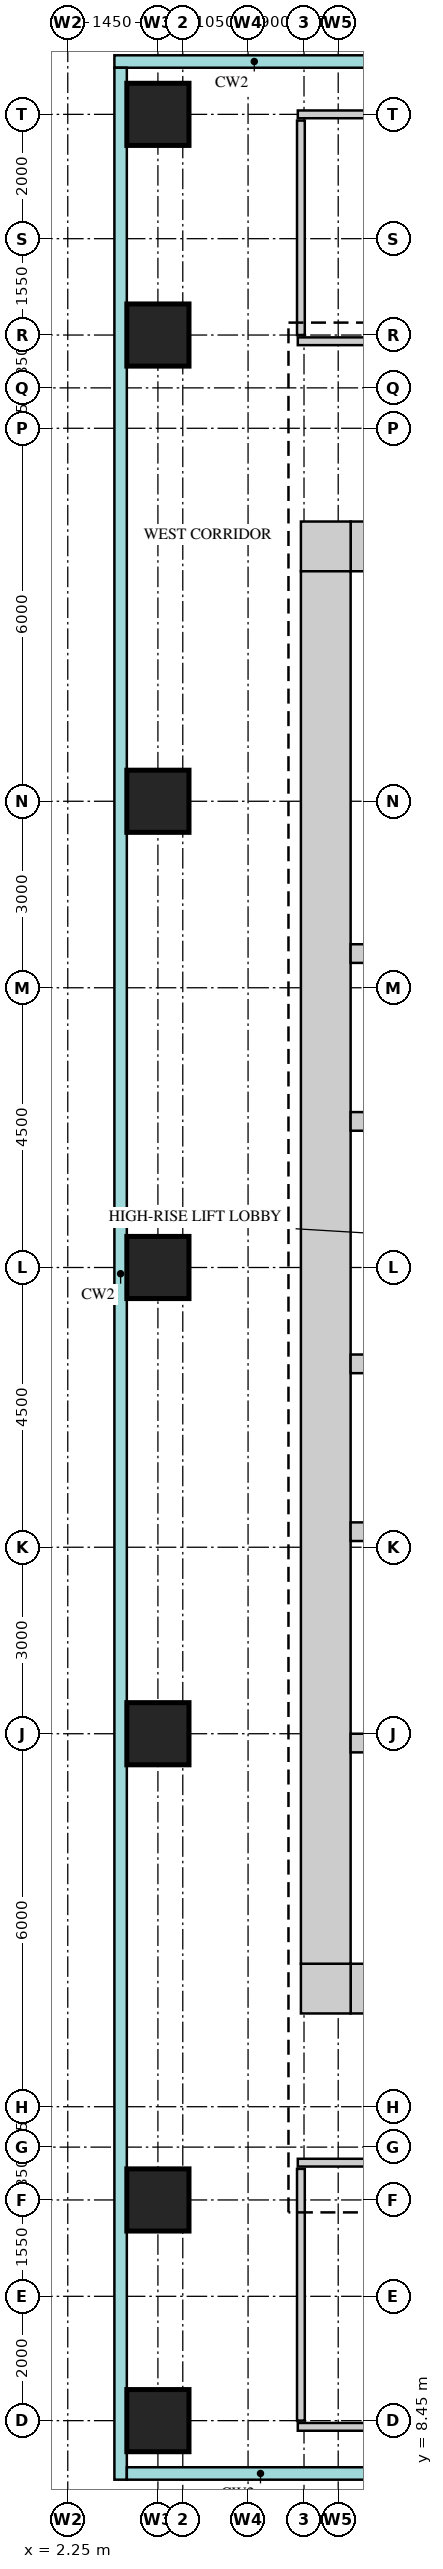
"""IFC4 building model, lengths in metres.
Left out: names, types, materials, properties, quantities, classifications, styles, units other than length and angle.
Written with IfcOpenShell. Run it as: python <this file> out.ifc"""

import sys

from ifc_helpers import new_model, si_unit, direction, frame, frame_2d, origin, origin_2d, place, context, subcontext, project, spatial, rectangle, extrude, source, transform, mapped, element, save


model = new_model("IFC4")
c1 = context("Model", 3, precision=1e-05, world=origin(), true_north=direction((0.0, 1.0)))
c2 = subcontext(c1, "Body", "Model", "MODEL_VIEW")
j1 = project(units=[si_unit("LENGTHUNIT", "METRE"), si_unit("PLANEANGLEUNIT", "RADIAN")], contexts=[c1])
p1 = place(None, origin())
s1 = spatial("IfcSite", under=j1, at=p1, CompositionType="ELEMENT")
p2 = place(p1, origin())
s2 = spatial("IfcBuilding", under=s1, at=p2, CompositionType="ELEMENT")
p3 = place(p2, frame((0.0, 0.0, 208.7)))
s3 = spatial("IfcBuildingStorey", under=s2, at=p3, CompositionType="ELEMENT", Elevation=208.7)
m1 = source(origin(), c2, "Body", "SweptSolid", [
    extrude(rectangle(XDim=13.4, YDim=0.8, at=frame_2d((6.7, 0.0))), origin(), (0.0, 0.0, 1.0), 3.75),
])
p4 = place(p3, frame((6.8, 38.6, 0.0), z_axis=(0.0, 0.0, 1.0), x_axis=(1.0, 0.0, 0.0)))
e1 = element("IfcWall", 1, at=p4, inside=s3, PredefinedType="SHEAR", context=c2, shape_type="MappedRepresentation", body=[
    mapped(m1, transform((0.0, 0.0, 0.0))),
])
m2 = source(origin(), c2, "Body", "SweptSolid", [
    extrude(rectangle(XDim=0.9, YDim=2.1, at=frame_2d((0.45, 1.05))), frame((0.0, 0.41, 0.0), z_axis=(0.0, -1.0, 0.0), x_axis=(1.0, 0.0, 0.0)), (0.0, 0.0, 1.0), 0.82),
])
p5 = place(p4, frame((2.9, 0.0, 0.0)))
e2 = element("IfcOpeningElement", 2, at=p5, cuts=e1, PredefinedType="OPENING", context=c2, shape_type="MappedRepresentation", body=[
    mapped(m2, transform((0.0, 0.0, 0.0))),
])
p6 = place(p4, frame((7.9, 0.0, 0.0)))
e3 = element("IfcOpeningElement", 3, at=p6, cuts=e1, PredefinedType="OPENING", context=c2, shape_type="MappedRepresentation", body=[
    mapped(m2, transform((0.0, 0.0, 0.0))),
])
p7 = place(p4, frame((11.25, 0.0, 0.0)))
e4 = element("IfcOpeningElement", 4, at=p7, cuts=e1, PredefinedType="OPENING", context=c2, shape_type="MappedRepresentation", body=[
    mapped(m2, transform((0.0, 0.0, 0.0))),
])
m3 = source(origin(), c2, "Body", "SweptSolid", [
    extrude(rectangle(XDim=0.8, YDim=0.8, at=frame_2d((0.4, 0.0))), origin(), (0.0, 0.0, 1.0), 3.75),
])
p8 = place(p3, frame((6.0, 38.6, 0.0), z_axis=(0.0, 0.0, 1.0), x_axis=(1.0, 0.0, 0.0)))
e5 = element("IfcWall", 5, at=p8, inside=s3, PredefinedType="SHEAR", context=c2, shape_type="MappedRepresentation", body=[
    mapped(m3, transform((0.0, 0.0, 0.0))),
])
p9 = place(p3, frame((6.8, 15.4, 0.0), z_axis=(0.0, 0.0, 1.0), x_axis=(1.0, 0.0, 0.0)))
e6 = element("IfcWall", 6, at=p9, inside=s3, PredefinedType="SHEAR", context=c2, shape_type="MappedRepresentation", body=[
    mapped(m1, transform((0.0, 0.0, 0.0))),
])
m4 = source(origin(), c2, "Body", "SweptSolid", [
    extrude(rectangle(XDim=1.2, YDim=2.1, at=frame_2d((0.6, 1.05))), frame((0.0, 0.41, 0.0), z_axis=(0.0, -1.0, 0.0), x_axis=(1.0, 0.0, 0.0)), (0.0, 0.0, 1.0), 0.82),
])
p10 = place(p9, frame((5.4, 0.0, 0.0)))
e7 = element("IfcOpeningElement", 7, at=p10, cuts=e6, PredefinedType="OPENING", context=c2, shape_type="MappedRepresentation", body=[
    mapped(m4, transform((0.0, 0.0, 0.0))),
])
p11 = place(p9, frame((2.05, 0.0, 0.0)))
e8 = element("IfcOpeningElement", 8, at=p11, cuts=e6, PredefinedType="OPENING", context=c2, shape_type="MappedRepresentation", body=[
    mapped(m4, transform((0.0, 0.0, 0.0))),
])
m5 = source(origin(), c2, "Body", "SweptSolid", [
    extrude(rectangle(XDim=1.0, YDim=2.1, at=frame_2d((0.5, 1.05))), frame((0.0, 0.41, 0.0), z_axis=(0.0, -1.0, 0.0), x_axis=(1.0, 0.0, 0.0)), (0.0, 0.0, 1.0), 0.82),
])
p12 = place(p9, frame((7.9, 0.0, 0.0)))
e9 = element("IfcOpeningElement", 9, at=p12, cuts=e6, PredefinedType="OPENING", context=c2, shape_type="MappedRepresentation", body=[
    mapped(m5, transform((0.0, 0.0, 0.0))),
])
p13 = place(p3, frame((6.0, 15.4, 0.0), z_axis=(0.0, 0.0, 1.0), x_axis=(1.0, 0.0, 0.0)))
e10 = element("IfcWall", 10, at=p13, inside=s3, PredefinedType="SHEAR", context=c2, shape_type="MappedRepresentation", body=[
    mapped(m3, transform((0.0, 0.0, 0.0))),
])
m6 = source(origin(), c2, "Body", "SweptSolid", [
    extrude(rectangle(XDim=22.4, YDim=0.8, at=frame_2d((11.2, 0.0))), origin(), (0.0, 0.0, 1.0), 3.75),
])
p14 = place(p3, frame((6.4, 15.8, 0.0), z_axis=(0.0, 0.0, 1.0), x_axis=(0.0, 1.0, 0.0)))
e11 = element("IfcWall", 11, at=p14, inside=s3, PredefinedType="SHEAR", context=c2, shape_type="MappedRepresentation", body=[
    mapped(m6, transform((0.0, 0.0, 0.0))),
])
m7 = source(origin(), c2, "Body", "SweptSolid", [
    extrude(rectangle(XDim=13.4, YDim=0.3, at=frame_2d((6.7, 0.0))), origin(), (0.0, 0.0, 1.0), 3.75),
])
p15 = place(p3, frame((6.8, 22.75, 0.0), z_axis=(0.0, 0.0, 1.0), x_axis=(1.0, 0.0, 0.0)))
e12 = element("IfcWall", 12, at=p15, inside=s3, PredefinedType="STANDARD", context=c2, shape_type="MappedRepresentation", body=[
    mapped(m7, transform((0.0, 0.0, 0.0))),
])
m8 = source(origin(), c2, "Body", "SweptSolid", [
    extrude(rectangle(XDim=9.275, YDim=0.3, at=frame_2d((4.637, 0.0))), origin(), (0.0, 0.0, 1.0), 3.75),
])
p16 = place(p3, frame((6.8, 19.35, 0.0), z_axis=(0.0, 0.0, 1.0), x_axis=(1.0, 0.0, 0.0)))
e13 = element("IfcWall", 13, at=p16, inside=s3, PredefinedType="STANDARD", context=c2, shape_type="MappedRepresentation", body=[
    mapped(m8, transform((0.0, 0.0, 0.0))),
])
m9 = source(origin(), c2, "Body", "SweptSolid", [
    extrude(rectangle(XDim=1.2, YDim=2.1, at=frame_2d((0.6, 1.05))), frame((0.0, 0.16, 0.0), z_axis=(0.0, -1.0, 0.0), x_axis=(1.0, 0.0, 0.0)), (0.0, 0.0, 1.0), 0.32),
])
p17 = place(p16, frame((0.85, 0.0, 0.0)))
e14 = element("IfcOpeningElement", 14, at=p17, cuts=e13, PredefinedType="OPENING", context=c2, shape_type="MappedRepresentation", body=[
    mapped(m9, transform((0.0, 0.0, 0.0))),
])
p18 = place(p16, frame((3.2, 0.0, 0.0)))
e15 = element("IfcOpeningElement", 15, at=p18, cuts=e13, PredefinedType="OPENING", context=c2, shape_type="MappedRepresentation", body=[
    mapped(m9, transform((0.0, 0.0, 0.0))),
])
p19 = place(p16, frame((5.45, 0.0, 0.0)))
e16 = element("IfcOpeningElement", 16, at=p19, cuts=e13, PredefinedType="OPENING", context=c2, shape_type="MappedRepresentation", body=[
    mapped(m9, transform((0.0, 0.0, 0.0))),
])
p20 = place(p16, frame((7.6, 0.0, 0.0)))
e17 = element("IfcOpeningElement", 17, at=p20, cuts=e13, PredefinedType="OPENING", context=c2, shape_type="MappedRepresentation", body=[
    mapped(m9, transform((0.0, 0.0, 0.0))),
])
p21 = place(p3, frame((6.8, 32.05, 0.0), z_axis=(0.0, 0.0, 1.0), x_axis=(1.0, 0.0, 0.0)))
e18 = element("IfcWall", 18, at=p21, inside=s3, PredefinedType="STANDARD", context=c2, shape_type="MappedRepresentation", body=[
    mapped(m7, transform((0.0, 0.0, 0.0))),
])
p22 = place(p3, frame((6.8, 29.35, 0.0), z_axis=(0.0, 0.0, 1.0), x_axis=(1.0, 0.0, 0.0)))
e19 = element("IfcWall", 19, at=p22, inside=s3, PredefinedType="STANDARD", context=c2, shape_type="MappedRepresentation", body=[
    mapped(m7, transform((0.0, 0.0, 0.0))),
])
p23 = place(p22, frame((0.95, 0.0, 0.0)))
e20 = element("IfcOpeningElement", 20, at=p23, cuts=e19, PredefinedType="OPENING", context=c2, shape_type="MappedRepresentation", body=[
    mapped(m9, transform((0.0, 0.0, 0.0))),
])
p24 = place(p22, frame((3.5, 0.0, 0.0)))
e21 = element("IfcOpeningElement", 21, at=p24, cuts=e19, PredefinedType="OPENING", context=c2, shape_type="MappedRepresentation", body=[
    mapped(m9, transform((0.0, 0.0, 0.0))),
])
p25 = place(p22, frame((6.05, 0.0, 0.0)))
e22 = element("IfcOpeningElement", 22, at=p25, cuts=e19, PredefinedType="OPENING", context=c2, shape_type="MappedRepresentation", body=[
    mapped(m9, transform((0.0, 0.0, 0.0))),
])
p26 = place(p22, frame((8.6, 0.0, 0.0)))
e23 = element("IfcOpeningElement", 23, at=p26, cuts=e19, PredefinedType="OPENING", context=c2, shape_type="MappedRepresentation", body=[
    mapped(m9, transform((0.0, 0.0, 0.0))),
])
p27 = place(p22, frame((11.15, 0.0, 0.0)))
e24 = element("IfcOpeningElement", 24, at=p27, cuts=e19, PredefinedType="OPENING", context=c2, shape_type="MappedRepresentation", body=[
    mapped(m9, transform((0.0, 0.0, 0.0))),
])
p28 = place(p3, frame((6.8, 25.45, 0.0), z_axis=(0.0, 0.0, 1.0), x_axis=(1.0, 0.0, 0.0)))
e25 = element("IfcWall", 25, at=p28, inside=s3, PredefinedType="STANDARD", context=c2, shape_type="MappedRepresentation", body=[
    mapped(m7, transform((0.0, 0.0, 0.0))),
])
p29 = place(p28, frame((0.95, 0.0, 0.0)))
e26 = element("IfcOpeningElement", 26, at=p29, cuts=e25, PredefinedType="OPENING", context=c2, shape_type="MappedRepresentation", body=[
    mapped(m9, transform((0.0, 0.0, 0.0))),
])
p30 = place(p28, frame((3.5, 0.0, 0.0)))
e27 = element("IfcOpeningElement", 27, at=p30, cuts=e25, PredefinedType="OPENING", context=c2, shape_type="MappedRepresentation", body=[
    mapped(m9, transform((0.0, 0.0, 0.0))),
])
p31 = place(p28, frame((6.05, 0.0, 0.0)))
e28 = element("IfcOpeningElement", 28, at=p31, cuts=e25, PredefinedType="OPENING", context=c2, shape_type="MappedRepresentation", body=[
    mapped(m9, transform((0.0, 0.0, 0.0))),
])
p32 = place(p28, frame((8.6, 0.0, 0.0)))
e29 = element("IfcOpeningElement", 29, at=p32, cuts=e25, PredefinedType="OPENING", context=c2, shape_type="MappedRepresentation", body=[
    mapped(m9, transform((0.0, 0.0, 0.0))),
])
p33 = place(p28, frame((11.15, 0.0, 0.0)))
e30 = element("IfcOpeningElement", 30, at=p33, cuts=e25, PredefinedType="OPENING", context=c2, shape_type="MappedRepresentation", body=[
    mapped(m9, transform((0.0, 0.0, 0.0))),
])
m10 = source(origin(), c2, "Body", "SweptSolid", [
    extrude(rectangle(XDim=1.0, YDim=1.0, at=origin_2d()), origin(), (0.0, 0.0, 1.0), 3.75),
])
for number, where, z_axis, x_axis in (
    (31, (3.7, 8.45, 0.0), (0.0, 0.0, 1.0), (1.0, 0.0, 0.0)),
    (32, (3.7, 12.0, 0.0), (0.0, 0.0, 1.0), (1.0, 0.0, 0.0)),
    (33, (3.7, 19.5, 0.0), (0.0, 0.0, 1.0), (1.0, 0.0, 0.0)),
    (34, (3.7, 27.0, 0.0), (0.0, 0.0, 1.0), (1.0, 0.0, 0.0)),
    (35, (3.7, 34.5, 0.0), (0.0, 0.0, 1.0), (1.0, 0.0, 0.0)),
    (36, (3.7, 42.0, 0.0), (0.0, 0.0, 1.0), (1.0, 0.0, 0.0)),
    (37, (3.7, 45.55, 0.0), (0.0, 0.0, 1.0), (1.0, 0.0, 0.0)),
):
    element("IfcColumn", number, at=place(p3, frame(where, z_axis=z_axis, x_axis=x_axis)), inside=s3, PredefinedType="COLUMN", context=c2, shape_type="MappedRepresentation", body=[
        mapped(m10, transform((0.0, 0.0, 0.0))),
    ])
m11 = source(origin(), c2, "Body", "SweptSolid", [
    extrude(rectangle(XDim=7.95, YDim=0.125, at=frame_2d((3.975, 0.0))), origin(), (0.0, 0.0, 1.0), 3.25),
])
p34 = place(p3, frame((5.95, 8.35, 0.0), z_axis=(0.0, 0.0, 1.0), x_axis=(1.0, 0.0, 0.0)))
e38 = element("IfcWall", 38, at=p34, inside=s3, PredefinedType="PARTITIONING", context=c2, shape_type="MappedRepresentation", body=[
    mapped(m11, transform((0.0, 0.0, 0.0))),
])
m12 = source(origin(), c2, "Body", "SweptSolid", [
    extrude(rectangle(XDim=0.9, YDim=2.1, at=frame_2d((0.45, 1.05))), frame((0.0, 0.073, 0.0), z_axis=(0.0, -1.0, 0.0), x_axis=(1.0, 0.0, 0.0)), (0.0, 0.0, 1.0), 0.145),
])
p35 = place(p34, frame((3.8, 0.0, 0.0)))
e39 = element("IfcOpeningElement", 39, at=p35, cuts=e38, PredefinedType="OPENING", context=c2, shape_type="MappedRepresentation", body=[
    mapped(m12, transform((0.0, 0.0, 0.0))),
])
m13 = source(origin(), c2, "Body", "SweptSolid", [
    extrude(rectangle(XDim=4.05, YDim=0.125, at=frame_2d((2.025, 0.0))), origin(), (0.0, 0.0, 1.0), 3.8),
])
p36 = place(p3, frame((6.0, 8.45, 0.0), z_axis=(0.0, 0.0, 1.0), x_axis=(0.0, 1.0, 0.0)))
e40 = element("IfcWall", 40, at=p36, inside=s3, PredefinedType="PARTITIONING", context=c2, shape_type="MappedRepresentation", body=[
    mapped(m13, transform((0.0, 0.0, 0.0))),
])
m14 = source(origin(), c2, "Body", "SweptSolid", [
    extrude(rectangle(XDim=8.0, YDim=0.125, at=frame_2d((4.0, 0.0))), origin(), (0.0, 0.0, 1.0), 3.8),
])
p37 = place(p3, frame((5.95, 12.6, 0.0), z_axis=(0.0, 0.0, 1.0), x_axis=(1.0, 0.0, 0.0)))
e41 = element("IfcWall", 41, at=p37, inside=s3, PredefinedType="PARTITIONING", context=c2, shape_type="MappedRepresentation", body=[
    mapped(m14, transform((0.0, 0.0, 0.0))),
])
m15 = source(origin(), c2, "Body", "SweptSolid", [
    extrude(rectangle(XDim=7.95, YDim=0.125, at=frame_2d((3.975, 0.0))), origin(), (0.0, 0.0, 1.0), 3.8),
])
p38 = place(p3, frame((5.95, 41.9, 0.0), z_axis=(0.0, 0.0, 1.0), x_axis=(1.0, 0.0, 0.0)))
e42 = element("IfcWall", 42, at=p38, inside=s3, PredefinedType="PARTITIONING", context=c2, shape_type="MappedRepresentation", body=[
    mapped(m15, transform((0.0, 0.0, 0.0))),
])
p39 = place(p38, frame((1.55, 0.0, 0.0)))
e43 = element("IfcOpeningElement", 43, at=p39, cuts=e42, PredefinedType="OPENING", context=c2, shape_type="MappedRepresentation", body=[
    mapped(m12, transform((0.0, 0.0, 0.0))),
])
p40 = place(p38, frame((5.65, 0.0, 0.0)))
e44 = element("IfcOpeningElement", 44, at=p40, cuts=e42, PredefinedType="OPENING", context=c2, shape_type="MappedRepresentation", body=[
    mapped(m12, transform((0.0, 0.0, 0.0))),
])
m16 = source(origin(), c2, "Body", "SweptSolid", [
    extrude(rectangle(XDim=3.45, YDim=0.125, at=frame_2d((1.725, 0.0))), origin(), (0.0, 0.0, 1.0), 3.8),
])
p41 = place(p3, frame((6.0, 42.0, 0.0), z_axis=(0.0, 0.0, 1.0), x_axis=(0.0, 1.0, 0.0)))
e45 = element("IfcWall", 45, at=p41, inside=s3, PredefinedType="PARTITIONING", context=c2, shape_type="MappedRepresentation", body=[
    mapped(m16, transform((0.0, 0.0, 0.0))),
])
p42 = place(p3, frame((5.95, 45.55, 0.0), z_axis=(0.0, 0.0, 1.0), x_axis=(1.0, 0.0, 0.0)))
e46 = element("IfcWall", 46, at=p42, inside=s3, PredefinedType="PARTITIONING", context=c2, shape_type="MappedRepresentation", body=[
    mapped(m11, transform((0.0, 0.0, 0.0))),
])
save(model, sys.argv[1])
